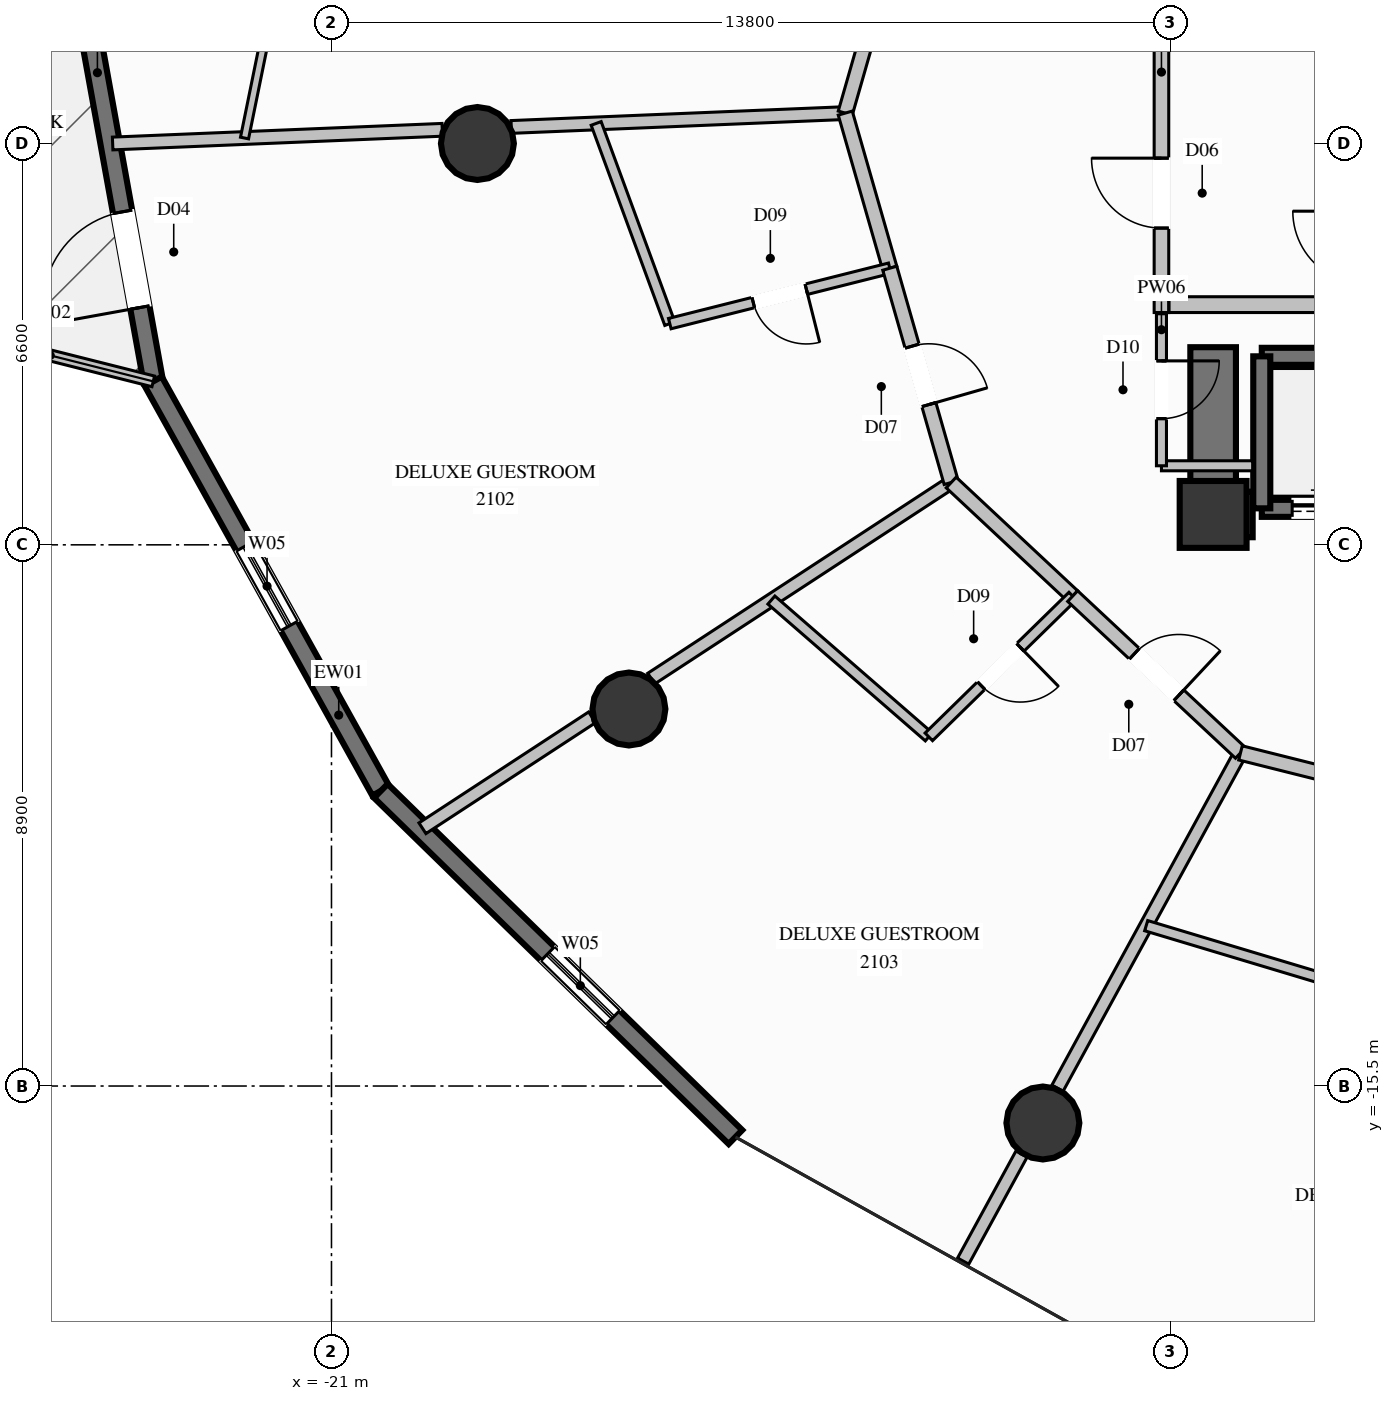
"""IFC4 building model, lengths in metres.
Left out: names, types, materials, properties, quantities, classifications, styles, units other than length and angle.
Written with IfcOpenShell. Run it as: python <this file> out.ifc"""

import sys

from ifc_helpers import new_model, si_unit, direction, frame, frame_2d, origin, origin_2d, place, context, subcontext, project, spatial, rectangle, circle, extrude, element, fill, save


model = new_model("IFC4")
c1 = context("Model", 3, precision=1e-05, world=origin(), true_north=direction((0.0, 1.0)))
c2 = subcontext(c1, "Body", "Model", "MODEL_VIEW")
j1 = project(units=[si_unit("LENGTHUNIT", "METRE"), si_unit("PLANEANGLEUNIT", "RADIAN")], contexts=[c1])
p1 = place(None, origin())
s1 = spatial("IfcSite", under=j1, at=p1, CompositionType="ELEMENT")
p2 = place(p1, origin())
s2 = spatial("IfcBuilding", under=s1, at=p2, CompositionType="ELEMENT")
p3 = place(p2, frame((0.0, 0.0, 78.8)))
s3 = spatial("IfcBuildingStorey", under=s2, at=p3, CompositionType="ELEMENT", Elevation=78.8)
p4 = place(p3, frame((-6.5, -6.1, 0.0), z_axis=(0.0, 0.0, 1.0), x_axis=(1.0, 0.0, 0.0)))
e1 = element("IfcColumn", 1, at=p4, inside=s3, PredefinedType="COLUMN", context=c2, shape_type="SweptSolid", body=[
    extrude(rectangle(XDim=1.1, YDim=1.1, at=origin_2d()), origin(), (0.0, 0.0, 1.0), 3.6),
])
p5 = place(p3, frame((-6.125, -6.1, 0.0), z_axis=(0.0, 0.0, 1.0), x_axis=(1.0, 0.0, 0.0)))
e2 = element("IfcWall", 2, at=p5, inside=s3, PredefinedType="SHEAR", context=c2, shape_type="SweptSolid", body=[
    extrude(rectangle(XDim=0.275, YDim=0.75, at=frame_2d((0.137, 0.0))), origin(), (0.0, 0.0, 1.0), 3.6),
])
p6 = place(p3, frame((-6.5, -6.475, 0.0), z_axis=(0.0, 0.0, 1.0), x_axis=(0.0, 1.0, 0.0)))
e3 = element("IfcWall", 3, at=p6, inside=s3, PredefinedType="SHEAR", context=c2, shape_type="SweptSolid", body=[
    extrude(rectangle(XDim=3.125, YDim=0.75, at=frame_2d((1.562, 0.0))), origin(), (0.0, 0.0, 1.0), 3.6),
])
for number, where, z_axis, x_axis in (
    (4, (-18.6, 0.0, 0.0), (0.0, 0.0, 1.0), (1.0, 0.0, 0.0)),
    (5, (-16.108, -9.3, 0.0), (0.0, 0.0, 1.0), (1.0, 0.0, 0.0)),
    (6, (-9.3, -16.108, 0.0), (0.0, 0.0, 1.0), (1.0, 0.0, 0.0)),
):
    element("IfcColumn", number, at=place(p3, frame(where, z_axis=z_axis, x_axis=x_axis)), inside=s3, PredefinedType="COLUMN", context=c2, shape_type="SweptSolid", body=[
        extrude(circle(Radius=0.6, at=origin_2d()), origin(), (0.0, 0.0, 1.0), 3.6),
    ])
p7 = place(p3, frame((-23.931, -3.912, 0.0), z_axis=(0.0, 0.0, 1.0), x_axis=(-0.178065653106, 0.984018609165, 0.0)))
e7 = element("IfcWall", 7, at=p7, inside=s3, PredefinedType="SOLIDWALL", context=c2, shape_type="SweptSolid", body=[
    extrude(rectangle(XDim=7.234, YDim=0.32, at=frame_2d((3.617, 0.0))), origin(), (0.0, 0.0, 1.0), 3.34),
])
p8 = place(p7, frame((1.234, 0.0, 0.0)))
e8 = element("IfcOpeningElement", 8, at=p8, cuts=e7, PredefinedType="OPENING", context=c2, shape_type="SweptSolid", body=[
    extrude(rectangle(XDim=1.6, YDim=2.3, at=frame_2d((0.8, 1.15))), frame((0.0, 0.17, 0.0), z_axis=(0.0, -1.0, 0.0), x_axis=(1.0, 0.0, 0.0)), (0.0, 0.0, 1.0), 0.34),
])
p9 = place(p3, frame((-20.188, -10.647, 0.0), z_axis=(0.0, 0.0, 1.0), x_axis=(-0.485774750474, 0.874084030172, 0.0)))
e9 = element("IfcWall", 9, at=p9, inside=s3, PredefinedType="SOLIDWALL", context=c2, shape_type="SweptSolid", body=[
    extrude(rectangle(XDim=7.705, YDim=0.32, at=frame_2d((3.853, 0.0))), origin(), (0.0, 0.0, 1.0), 3.34),
])
p10 = place(p9, frame((3.103, 0.0, 0.85)))
e10 = element("IfcOpeningElement", 10, at=p10, cuts=e9, PredefinedType="OPENING", context=c2, shape_type="SweptSolid", body=[
    extrude(rectangle(XDim=1.5, YDim=1.2, at=frame_2d((0.75, 0.6))), frame((0.0, 0.17, 0.0), z_axis=(0.0, -1.0, 0.0), x_axis=(1.0, 0.0, 0.0)), (0.0, 0.0, 1.0), 0.34),
])
p11 = place(p3, frame((-14.356, -16.339, 0.0), z_axis=(0.0, 0.0, 1.0), x_axis=(-0.715637667014, 0.698471709914, 0.0)))
e11 = element("IfcWall", 11, at=p11, inside=s3, PredefinedType="SOLIDWALL", context=c2, shape_type="SweptSolid", body=[
    extrude(rectangle(XDim=8.149, YDim=0.32, at=frame_2d((4.075, 0.0))), origin(), (0.0, 0.0, 1.0), 3.34),
])
p12 = place(p11, frame((2.815, 0.0, 0.85)))
e12 = element("IfcOpeningElement", 12, at=p12, cuts=e11, PredefinedType="OPENING", context=c2, shape_type="SweptSolid", body=[
    extrude(rectangle(XDim=1.5, YDim=1.2, at=frame_2d((0.75, 0.6))), frame((0.0, 0.17, 0.0), z_axis=(0.0, -1.0, 0.0), x_axis=(1.0, 0.0, 0.0)), (0.0, 0.0, 1.0), 0.34),
])
p13 = place(p3, frame((-27.319, -3.058, 0.0), z_axis=(0.0, 0.0, 1.0), x_axis=(0.969672141927, -0.244409363918, 0.0)))
e13 = element("IfcWall", 13, at=p13, inside=s3, PredefinedType="PARAPET", context=c2, shape_type="SweptSolid", body=[
    extrude(rectangle(XDim=3.494, YDim=0.18, at=frame_2d((1.747, 0.0))), origin(), (0.0, 0.0, 1.0), 1.12),
])
p14 = place(p3, frame((-5.7, -6.0, 0.0), z_axis=(0.0, 0.0, 1.0), x_axis=(1.0, 0.0, 0.0)))
e14 = element("IfcWall", 14, at=p14, inside=s3, PredefinedType="SOLIDWALL", context=c2, shape_type="SweptSolid", body=[
    extrude(rectangle(XDim=2.1, YDim=0.28, at=frame_2d((1.05, 0.0))), origin(), (0.0, 0.0, 1.0), 3.34),
])
p15 = place(p14, frame((0.5, 0.0, 0.0)))
e15 = element("IfcOpeningElement", 15, at=p15, cuts=e14, PredefinedType="OPENING", context=c2, shape_type="SweptSolid", body=[
    extrude(rectangle(XDim=1.1, YDim=2.2, at=frame_2d((0.55, 1.1))), frame((0.0, 0.15, 0.0), z_axis=(0.0, -1.0, 0.0), x_axis=(1.0, 0.0, 0.0)), (0.0, 0.0, 1.0), 0.3),
])
p16 = place(p3, frame((-3.6, -3.5, 0.0), z_axis=(0.0, 0.0, 1.0), x_axis=(-1.0, 0.0, 0.0)))
e16 = element("IfcWall", 16, at=p16, inside=s3, PredefinedType="SOLIDWALL", context=c2, shape_type="SweptSolid", body=[
    extrude(rectangle(XDim=2.1, YDim=0.28, at=frame_2d((1.05, 0.0))), origin(), (0.0, 0.0, 1.0), 3.34),
])
p17 = place(p3, frame((-5.7, -3.5, 0.0), z_axis=(0.0, 0.0, 1.0), x_axis=(0.0, -1.0, 0.0)))
e17 = element("IfcWall", 17, at=p17, inside=s3, PredefinedType="SOLIDWALL", context=c2, shape_type="SweptSolid", body=[
    extrude(rectangle(XDim=2.5, YDim=0.28, at=frame_2d((1.25, 0.0))), origin(), (0.0, 0.0, 1.0), 3.34),
])
p18 = place(p3, frame((-7.35, -2.78, 0.0), z_axis=(0.0, 0.0, 1.0), x_axis=(0.0, 1.0, 0.0)))
e18 = element("IfcWall", 18, at=p18, inside=s3, PredefinedType="PARTITIONING", context=c2, shape_type="SweptSolid", body=[
    extrude(rectangle(XDim=5.12, YDim=0.24, at=frame_2d((2.56, 0.0))), origin(), (0.0, 0.0, 1.0), 2.425),
])
p19 = place(p18, frame((1.389, 0.0, 0.0)))
e19 = element("IfcOpeningElement", 19, at=p19, cuts=e18, PredefinedType="OPENING", context=c2, shape_type="SweptSolid", body=[
    extrude(rectangle(XDim=1.15, YDim=2.2, at=frame_2d((0.575, 1.1))), frame((0.0, 0.13, 0.0), z_axis=(0.0, -1.0, 0.0), x_axis=(1.0, 0.0, 0.0)), (0.0, 0.0, 1.0), 0.26),
])
p20 = place(p3, frame((-7.225, -2.65, 0.0), z_axis=(0.0, 0.0, 1.0), x_axis=(1.0, 0.0, 0.0)))
e20 = element("IfcWall", 20, at=p20, inside=s3, PredefinedType="PARTITIONING", context=c2, shape_type="SweptSolid", body=[
    extrude(rectangle(XDim=3.095, YDim=0.26, at=frame_2d((1.548, 0.0))), origin(), (0.0, 0.0, 1.0), 3.34),
])
p21 = place(p3, frame((-7.35, -5.3, 0.0), z_axis=(0.0, 0.0, 1.0), x_axis=(1.0, 0.0, 0.0)))
e21 = element("IfcWall", 21, at=p21, inside=s3, PredefinedType="PARTITIONING", context=c2, shape_type="SweptSolid", body=[
    extrude(rectangle(XDim=1.5, YDim=0.165, at=frame_2d((0.75, 0.0))), origin(), (0.0, 0.0, 1.0), 2.425),
])
p22 = place(p3, frame((-7.35, -2.8, 0.0), z_axis=(0.0, 0.0, 1.0), x_axis=(0.0, -1.0, 0.0)))
e22 = element("IfcWall", 22, at=p22, inside=s3, PredefinedType="PARTITIONING", context=c2, shape_type="SweptSolid", body=[
    extrude(rectangle(XDim=2.5, YDim=0.165, at=frame_2d((1.25, 0.0))), origin(), (0.0, 0.0, 1.0), 3.34),
])
p23 = place(p22, frame((0.775, 0.0, 0.0)))
e23 = element("IfcOpeningElement", 23, at=p23, cuts=e22, PredefinedType="OPENING", context=c2, shape_type="SweptSolid", body=[
    extrude(rectangle(XDim=0.95, YDim=2.1, at=frame_2d((0.475, 1.05))), frame((0.0, 0.093, 0.0), z_axis=(0.0, -1.0, 0.0), x_axis=(1.0, 0.0, 0.0)), (0.0, 0.0, 1.0), 0.185),
])
p24 = place(p3, frame((-12.55, 0.5, 0.0), z_axis=(0.0, 0.0, 1.0), x_axis=(-0.999139449334, -0.041477232129, 0.0)))
e24 = element("IfcWall", 24, at=p24, inside=s3, PredefinedType="PARTITIONING", context=c2, shape_type="SweptSolid", body=[
    extrude(rectangle(XDim=5.498, YDim=0.21, at=frame_2d((2.749, 0.0))), origin(), (0.0, 0.0, 1.0), 2.421),
])
p25 = place(p3, frame((-19.178, 0.225, 0.0), z_axis=(0.0, 0.0, 1.0), x_axis=(-0.999139067382, -0.04148643189, 0.0)))
e25 = element("IfcWall", 25, at=p25, inside=s3, PredefinedType="PARTITIONING", context=c2, shape_type="SweptSolid", body=[
    extrude(rectangle(XDim=5.426, YDim=0.21, at=frame_2d((2.713, 0.0))), origin(), (0.0, 0.0, 1.0), 2.421),
])
p26 = place(p3, frame((-10.808, -5.575, 0.0), z_axis=(0.0, 0.0, 1.0), x_axis=(-0.836987857586, -0.547221459971, 0.0)))
e26 = element("IfcWall", 26, at=p26, inside=s3, PredefinedType="PARTITIONING", context=c2, shape_type="SweptSolid", body=[
    extrude(rectangle(XDim=5.894, YDim=0.21, at=frame_2d((2.947, 0.0))), origin(), (0.0, 0.0, 1.0), 2.708),
])
p27 = place(p3, frame((-16.713, -9.436, 0.0), z_axis=(0.0, 0.0, 1.0), x_axis=(-0.836961875398, -0.547261198268, 0.0)))
e27 = element("IfcWall", 27, at=p27, inside=s3, PredefinedType="PARTITIONING", context=c2, shape_type="SweptSolid", body=[
    extrude(rectangle(XDim=3.335, YDim=0.21, at=frame_2d((1.667, 0.0))), origin(), (0.0, 0.0, 1.0), 3.34),
])
p28 = place(p3, frame((-6.05, -10.022, 0.0), z_axis=(0.0, 0.0, 1.0), x_axis=(-0.479148902138, -0.877733632476, 0.0)))
e28 = element("IfcWall", 28, at=p28, inside=s3, PredefinedType="PARTITIONING", context=c2, shape_type="SweptSolid", body=[
    extrude(rectangle(XDim=6.282, YDim=0.21, at=frame_2d((3.141, 0.0))), origin(), (0.0, 0.0, 1.0), 2.708),
])
p29 = place(p3, frame((-9.651, -16.619, 0.0), z_axis=(0.0, 0.0, 1.0), x_axis=(-0.478928914957, -0.877853686225, 0.0)))
e29 = element("IfcWall", 29, at=p29, inside=s3, PredefinedType="PARTITIONING", context=c2, shape_type="SweptSolid", body=[
    extrude(rectangle(XDim=2.005, YDim=0.21, at=frame_2d((1.002, 0.0))), origin(), (0.0, 0.0, 1.0), 3.34),
])
p30 = place(p3, frame((-10.808, 6.575, 0.0), z_axis=(0.0, 0.0, 1.0), x_axis=(-0.275634306148, -0.961262570412, 0.0)))
e30 = element("IfcWall", 30, at=p30, inside=s3, PredefinedType="PARTITIONING", context=c2, shape_type="SweptSolid", body=[
    extrude(rectangle(XDim=6.32, YDim=0.24, at=frame_2d((3.16, 0.0))), origin(), (0.0, 0.0, 1.0), 3.34),
])
p31 = place(p3, frame((-20.073, 11.649, 0.0), z_axis=(0.0, 0.0, 1.0), x_axis=(-0.199796197969, -0.979837475951, 0.0)))
e31 = element("IfcWall", 31, at=p31, inside=s3, PredefinedType="PARTITIONING", context=c2, shape_type="SweptSolid", body=[
    extrude(rectangle(XDim=11.797, YDim=0.135, at=frame_2d((5.898, 0.0))), origin(), (0.0, 0.0, 1.0), 3.34),
])
p32 = place(p31, frame((5.423, 0.0, 0.0)))
e32 = element("IfcOpeningElement", 32, at=p32, cuts=e31, PredefinedType="OPENING", context=c2, shape_type="SweptSolid", body=[
    extrude(rectangle(XDim=0.95, YDim=2.1, at=frame_2d((0.475, 1.05))), frame((0.0, 0.078, 0.0), z_axis=(0.0, -1.0, 0.0), x_axis=(1.0, 0.0, 0.0)), (0.0, 0.0, 1.0), 0.155),
])
p33 = place(p3, frame((-12.55, 0.5, 0.0), z_axis=(0.0, 0.0, 1.0), x_axis=(0.275790140823, -0.961217872402, 0.0)))
e33 = element("IfcWall", 33, at=p33, inside=s3, PredefinedType="PARTITIONING", context=c2, shape_type="SweptSolid", body=[
    extrude(rectangle(XDim=2.654, YDim=0.24, at=frame_2d((1.327, 0.0))), origin(), (0.0, 0.0, 1.0), 3.34),
])
p34 = place(p3, frame((-16.647, 0.33, 0.0), z_axis=(0.0, 0.0, 1.0), x_axis=(0.345227943429, -0.93851886879, 0.0)))
e34 = element("IfcWall", 34, at=p34, inside=s3, PredefinedType="PLUMBINGWALL", context=c2, shape_type="SweptSolid", body=[
    extrude(rectangle(XDim=3.508, YDim=0.175, at=frame_2d((1.754, 0.0))), origin(), (0.0, 0.0, 1.0), 3.34),
])
p35 = place(p3, frame((-11.818, -2.051, 0.0), z_axis=(0.0, 0.0, 1.0), x_axis=(-0.969736972456, -0.244152010543, 0.0)))
e35 = element("IfcWall", 35, at=p35, inside=s3, PredefinedType="PLUMBINGWALL", context=c2, shape_type="SweptSolid", body=[
    extrude(rectangle(XDim=3.731, YDim=0.175, at=frame_2d((1.865, 0.0))), origin(), (0.0, 0.0, 1.0), 3.34),
])
p36 = place(p35, frame((1.415, 0.0, 0.0)))
e36 = element("IfcOpeningElement", 36, at=p36, cuts=e35, PredefinedType="OPENING", context=c2, shape_type="SweptSolid", body=[
    extrude(rectangle(XDim=0.9, YDim=2.1, at=frame_2d((0.45, 1.05))), frame((0.0, 0.098, 0.0), z_axis=(0.0, -1.0, 0.0), x_axis=(1.0, 0.0, 0.0)), (0.0, 0.0, 1.0), 0.195),
])
p37 = place(p3, frame((-11.818, -2.051, 0.0), z_axis=(0.0, 0.0, 1.0), x_axis=(0.275521481409, -0.961294914832, 0.0)))
e37 = element("IfcWall", 37, at=p37, inside=s3, PredefinedType="PARTITIONING", context=c2, shape_type="SweptSolid", body=[
    extrude(rectangle(XDim=3.666, YDim=0.24, at=frame_2d((1.833, 0.0))), origin(), (0.0, 0.0, 1.0), 3.34),
])
p38 = place(p37, frame((1.333, 0.0, 0.0)))
e38 = element("IfcOpeningElement", 38, at=p38, cuts=e37, PredefinedType="OPENING", context=c2, shape_type="SweptSolid", body=[
    extrude(rectangle(XDim=1.0, YDim=2.2, at=frame_2d((0.5, 1.1))), frame((0.0, 0.13, 0.0), z_axis=(0.0, -1.0, 0.0), x_axis=(1.0, 0.0, 0.0)), (0.0, 0.0, 1.0), 0.26),
])
p39 = place(p3, frame((-10.808, -5.575, 0.0), z_axis=(0.0, 0.0, 1.0), x_axis=(0.730449499178, -0.682966711597, 0.0)))
e39 = element("IfcWall", 39, at=p39, inside=s3, PredefinedType="PARTITIONING", context=c2, shape_type="SweptSolid", body=[
    extrude(rectangle(XDim=2.735, YDim=0.24, at=frame_2d((1.368, 0.0))), origin(), (0.0, 0.0, 1.0), 3.34),
])
p40 = place(p3, frame((-13.765, -7.508, 0.0), z_axis=(0.0, 0.0, 1.0), x_axis=(0.754777121654, -0.655981323384, 0.0)))
e40 = element("IfcWall", 40, at=p40, inside=s3, PredefinedType="PLUMBINGWALL", context=c2, shape_type="SweptSolid", body=[
    extrude(rectangle(XDim=3.43, YDim=0.175, at=frame_2d((1.715, 0.0))), origin(), (0.0, 0.0, 1.0), 3.34),
])
p41 = place(p3, frame((-8.81, -7.443, 0.0), z_axis=(0.0, 0.0, 1.0), x_axis=(-0.714772306892, -0.699357240114, 0.0)))
e41 = element("IfcWall", 41, at=p41, inside=s3, PredefinedType="PLUMBINGWALL", context=c2, shape_type="SweptSolid", body=[
    extrude(rectangle(XDim=3.31, YDim=0.175, at=frame_2d((1.655, 0.0))), origin(), (0.0, 0.0, 1.0), 2.708),
])
p42 = place(p41, frame((1.205, 0.0, 0.0)))
e42 = element("IfcOpeningElement", 42, at=p42, cuts=e41, PredefinedType="OPENING", context=c2, shape_type="SweptSolid", body=[
    extrude(rectangle(XDim=0.9, YDim=2.1, at=frame_2d((0.45, 1.05))), frame((0.0, 0.098, 0.0), z_axis=(0.0, -1.0, 0.0), x_axis=(1.0, 0.0, 0.0)), (0.0, 0.0, 1.0), 0.195),
])
p43 = place(p3, frame((-8.81, -7.443, 0.0), z_axis=(0.0, 0.0, 1.0), x_axis=(0.730679025356, -0.682721145054, 0.0)))
e43 = element("IfcWall", 43, at=p43, inside=s3, PredefinedType="PARTITIONING", context=c2, shape_type="SweptSolid", body=[
    extrude(rectangle(XDim=3.777, YDim=0.24, at=frame_2d((1.889, 0.0))), origin(), (0.0, 0.0, 1.0), 3.34),
])
p44 = place(p43, frame((1.389, 0.0, 0.0)))
e44 = element("IfcOpeningElement", 44, at=p44, cuts=e43, PredefinedType="OPENING", context=c2, shape_type="SweptSolid", body=[
    extrude(rectangle(XDim=1.0, YDim=2.2, at=frame_2d((0.5, 1.1))), frame((0.0, 0.13, 0.0), z_axis=(0.0, -1.0, 0.0), x_axis=(1.0, 0.0, 0.0)), (0.0, 0.0, 1.0), 0.26),
])
p45 = place(p3, frame((-6.05, -10.022, 0.0), z_axis=(0.0, 0.0, 1.0), x_axis=(0.970009682466, -0.243066278865, 0.0)))
e45 = element("IfcWall", 45, at=p45, inside=s3, PredefinedType="PARTITIONING", context=c2, shape_type="SweptSolid", body=[
    extrude(rectangle(XDim=2.814, YDim=0.24, at=frame_2d((1.407, 0.0))), origin(), (0.0, 0.0, 1.0), 3.34),
])
p46 = place(p3, frame((-7.601, -12.863, 0.0), z_axis=(0.0, 0.0, 1.0), x_axis=(0.957770002885, -0.287535426641, 0.0)))
e46 = element("IfcWall", 46, at=p46, inside=s3, PredefinedType="PLUMBINGWALL", context=c2, shape_type="SweptSolid", body=[
    extrude(rectangle(XDim=3.463, YDim=0.175, at=frame_2d((1.732, 0.0))), origin(), (0.0, 0.0, 1.0), 3.34),
])
p47 = place(p8, origin())
e47 = element("IfcDoor", 47, at=p47, inside=s3, OperationType="SINGLE_SWING_LEFT", PredefinedType="DOOR", context=c2, shape_type="SweptSolid", body=[
    extrude(rectangle(XDim=1.6, YDim=2.3, at=frame_2d((0.8, 1.15))), frame((0.0, 0.025, 0.0), z_axis=(0.0, -1.0, 0.0), x_axis=(1.0, 0.0, 0.0)), (0.0, 0.0, 1.0), 0.05),
])
fill(e8, e47)
p48 = place(p10, origin())
e48 = element("IfcWindow", 48, at=p48, inside=s3, PartitioningType="SINGLE_PANEL", PredefinedType="WINDOW", context=c2, shape_type="SweptSolid", body=[
    extrude(rectangle(XDim=1.5, YDim=1.2, at=frame_2d((0.75, 0.6))), frame((0.0, 0.03, 0.0), z_axis=(0.0, -1.0, 0.0), x_axis=(1.0, 0.0, 0.0)), (0.0, 0.0, 1.0), 0.06),
])
fill(e10, e48)
p49 = place(p12, origin())
e49 = element("IfcWindow", 49, at=p49, inside=s3, PartitioningType="SINGLE_PANEL", PredefinedType="WINDOW", context=c2, shape_type="SweptSolid", body=[
    extrude(rectangle(XDim=1.5, YDim=1.2, at=frame_2d((0.75, 0.6))), frame((0.0, 0.03, 0.0), z_axis=(0.0, -1.0, 0.0), x_axis=(1.0, 0.0, 0.0)), (0.0, 0.0, 1.0), 0.06),
])
fill(e12, e49)
p50 = place(p15, origin())
e50 = element("IfcDoor", 50, at=p50, inside=s3, OperationType="SLIDING_TO_LEFT", PredefinedType="DOOR", context=c2, shape_type="SweptSolid", body=[
    extrude(rectangle(XDim=1.1, YDim=2.2, at=frame_2d((0.55, 1.1))), frame((0.0, 0.025, 0.0), z_axis=(0.0, -1.0, 0.0), x_axis=(1.0, 0.0, 0.0)), (0.0, 0.0, 1.0), 0.05),
])
fill(e15, e50)
p51 = place(p19, origin())
e51 = element("IfcDoor", 51, at=p51, inside=s3, OperationType="SINGLE_SWING_RIGHT", PredefinedType="DOOR", context=c2, shape_type="SweptSolid", body=[
    extrude(rectangle(XDim=1.15, YDim=2.2, at=frame_2d((0.575, 1.1))), frame((0.0, 0.025, 0.0), z_axis=(0.0, -1.0, 0.0), x_axis=(1.0, 0.0, 0.0)), (0.0, 0.0, 1.0), 0.05),
])
fill(e19, e51)
p52 = place(p23, origin())
e52 = element("IfcDoor", 52, at=p52, inside=s3, OperationType="SINGLE_SWING_LEFT", PredefinedType="DOOR", context=c2, shape_type="SweptSolid", body=[
    extrude(rectangle(XDim=0.95, YDim=2.1, at=frame_2d((0.475, 1.05))), frame((0.0, 0.025, 0.0), z_axis=(0.0, -1.0, 0.0), x_axis=(1.0, 0.0, 0.0)), (0.0, 0.0, 1.0), 0.05),
])
fill(e23, e52)
p53 = place(p36, origin())
e53 = element("IfcDoor", 53, at=p53, inside=s3, OperationType="SINGLE_SWING_LEFT", PredefinedType="DOOR", context=c2, shape_type="SweptSolid", body=[
    extrude(rectangle(XDim=0.9, YDim=2.1, at=frame_2d((0.45, 1.05))), frame((0.0, 0.025, 0.0), z_axis=(0.0, -1.0, 0.0), x_axis=(1.0, 0.0, 0.0)), (0.0, 0.0, 1.0), 0.05),
])
fill(e36, e53)
p54 = place(p38, origin())
e54 = element("IfcDoor", 54, at=p54, inside=s3, OperationType="SINGLE_SWING_RIGHT", PredefinedType="DOOR", context=c2, shape_type="SweptSolid", body=[
    extrude(rectangle(XDim=1.0, YDim=2.2, at=frame_2d((0.5, 1.1))), frame((0.0, 0.025, 0.0), z_axis=(0.0, -1.0, 0.0), x_axis=(1.0, 0.0, 0.0)), (0.0, 0.0, 1.0), 0.05),
])
fill(e38, e54)
p55 = place(p42, origin())
e55 = element("IfcDoor", 55, at=p55, inside=s3, OperationType="SINGLE_SWING_LEFT", PredefinedType="DOOR", context=c2, shape_type="SweptSolid", body=[
    extrude(rectangle(XDim=0.9, YDim=2.1, at=frame_2d((0.45, 1.05))), frame((0.0, 0.025, 0.0), z_axis=(0.0, -1.0, 0.0), x_axis=(1.0, 0.0, 0.0)), (0.0, 0.0, 1.0), 0.05),
])
fill(e42, e55)
p56 = place(p44, origin())
e56 = element("IfcDoor", 56, at=p56, inside=s3, OperationType="SINGLE_SWING_RIGHT", PredefinedType="DOOR", context=c2, shape_type="SweptSolid", body=[
    extrude(rectangle(XDim=1.0, YDim=2.2, at=frame_2d((0.5, 1.1))), frame((0.0, 0.025, 0.0), z_axis=(0.0, -1.0, 0.0), x_axis=(1.0, 0.0, 0.0)), (0.0, 0.0, 1.0), 0.05),
])
fill(e44, e56)
save(model, sys.argv[1])
